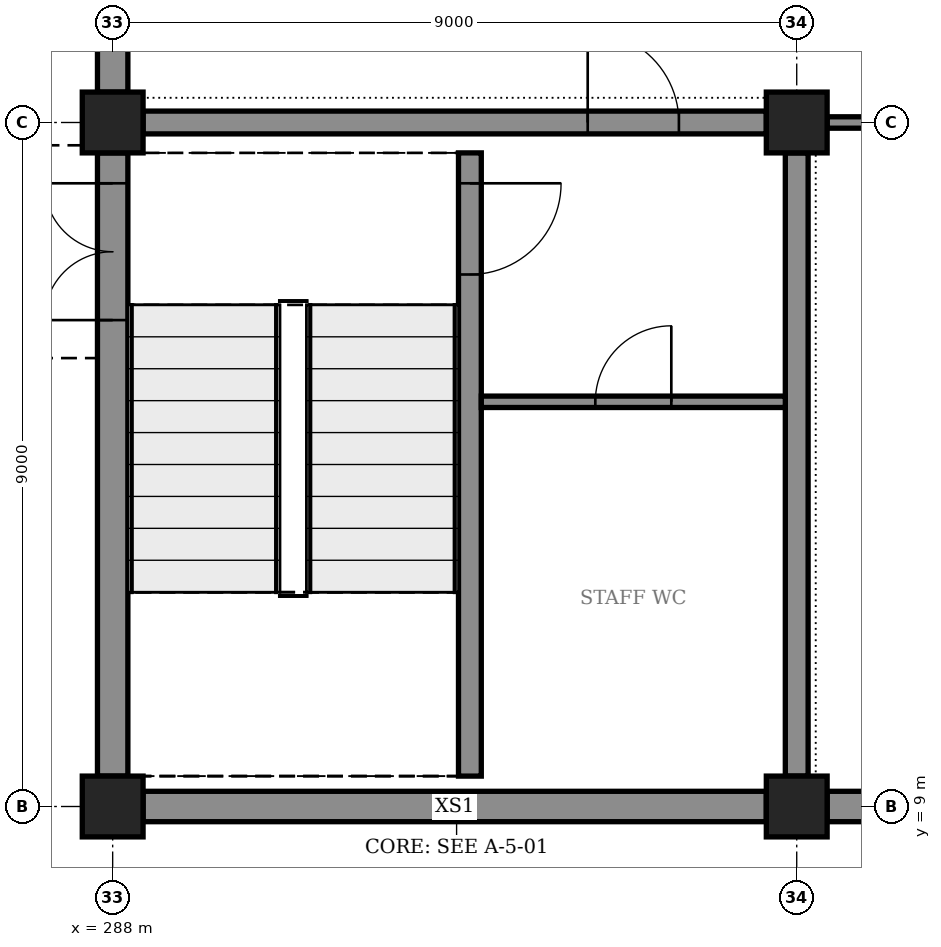
"""IFC4 building model, lengths in metres.
Left out: names, types, materials, properties, quantities, classifications, styles, units other than length and angle.
Written with IfcOpenShell. Run it as: python <this file> out.ifc"""

import sys

from ifc_helpers import new_model, si_unit, direction, frame, frame_2d, origin, origin_2d, place, context, subcontext, project, spatial, rectangle, extrude, element, fill, save


model = new_model("IFC4")
c1 = context("Model", 3, precision=1e-05, world=origin(), true_north=direction((0.0, 1.0)))
c2 = subcontext(c1, "Body", "Model", "MODEL_VIEW")
j1 = project(units=[si_unit("LENGTHUNIT", "METRE"), si_unit("PLANEANGLEUNIT", "RADIAN")], contexts=[c1])
p1 = place(None, origin())
s1 = spatial("IfcSite", under=j1, at=p1, CompositionType="ELEMENT")
p2 = place(p1, origin())
s2 = spatial("IfcBuilding", under=s1, at=p2, CompositionType="ELEMENT")
p3 = place(p2, origin())
s3 = spatial("IfcBuildingStorey", under=s2, at=p3, CompositionType="ELEMENT", Elevation=0.0)
for number, where, z_axis, x_axis in (
    (1, (288.0, 9.0, -0.3), (0.0, 0.0, 1.0), (1.0, 0.0, 0.0)),
    (2, (297.0, 9.0, -0.3), (0.0, 0.0, 1.0), (1.0, 0.0, 0.0)),
    (3, (288.0, 18.0, -0.3), (0.0, 0.0, 1.0), (1.0, 0.0, 0.0)),
    (4, (297.0, 18.0, -0.3), (0.0, 0.0, 1.0), (1.0, 0.0, 0.0)),
):
    element("IfcColumn", number, at=place(p3, frame(where, z_axis=z_axis, x_axis=x_axis)), inside=s3, PredefinedType="COLUMN", context=c2, shape_type="SweptSolid", body=[
        extrude(rectangle(XDim=0.8, YDim=0.8, at=origin_2d()), origin(), (0.0, 0.0, 1.0), 6.02),
    ])
p4 = place(p3, frame((288.0, 9.4, 0.0), z_axis=(0.0, 0.0, 1.0), x_axis=(0.0, 1.0, 0.0)))
e5 = element("IfcWall", 5, at=p4, inside=s3, PredefinedType="STANDARD", context=c2, shape_type="SweptSolid", body=[
    extrude(rectangle(XDim=8.2, YDim=0.4, at=frame_2d((4.1, 0.0))), origin(), (0.0, 0.0, 1.0), 5.02),
])
p5 = place(p4, frame((6.0, 0.0, 0.0)))
e6 = element("IfcOpeningElement", 6, at=p5, cuts=e5, PredefinedType="OPENING", context=c2, shape_type="SweptSolid", body=[
    extrude(rectangle(XDim=1.8, YDim=2.4, at=frame_2d((0.9, 1.2))), frame((0.0, 0.21, 0.0), z_axis=(0.0, -1.0, 0.0), x_axis=(1.0, 0.0, 0.0)), (0.0, 0.0, 1.0), 0.42),
])
p6 = place(p3, frame((288.0, 18.4, 0.0), z_axis=(0.0, 0.0, 1.0), x_axis=(0.0, 1.0, 0.0)))
e7 = element("IfcWall", 7, at=p6, inside=s3, PredefinedType="STANDARD", context=c2, shape_type="SweptSolid", body=[
    extrude(rectangle(XDim=8.2, YDim=0.4, at=frame_2d((4.1, 0.0))), origin(), (0.0, 0.0, 1.0), 5.02),
])
p7 = place(p6, frame((1.05, 0.0, 0.9)))
e8 = element("IfcOpeningElement", 8, at=p7, cuts=e7, PredefinedType="OPENING", context=c2, shape_type="SweptSolid", body=[
    extrude(rectangle(XDim=1.5, YDim=1.8, at=frame_2d((0.75, 0.9))), frame((0.0, 0.21, 0.0), z_axis=(0.0, -1.0, 0.0), x_axis=(1.0, 0.0, 0.0)), (0.0, 0.0, 1.0), 0.42),
])
p8 = place(p6, frame((3.55, 0.0, 0.9)))
e9 = element("IfcOpeningElement", 9, at=p8, cuts=e7, PredefinedType="OPENING", context=c2, shape_type="SweptSolid", body=[
    extrude(rectangle(XDim=1.5, YDim=1.8, at=frame_2d((0.75, 0.9))), frame((0.0, 0.21, 0.0), z_axis=(0.0, -1.0, 0.0), x_axis=(1.0, 0.0, 0.0)), (0.0, 0.0, 1.0), 0.42),
])
p9 = place(p6, frame((6.05, 0.0, 0.9)))
e10 = element("IfcOpeningElement", 10, at=p9, cuts=e7, PredefinedType="OPENING", context=c2, shape_type="SweptSolid", body=[
    extrude(rectangle(XDim=1.5, YDim=1.8, at=frame_2d((0.75, 0.9))), frame((0.0, 0.21, 0.0), z_axis=(0.0, -1.0, 0.0), x_axis=(1.0, 0.0, 0.0)), (0.0, 0.0, 1.0), 0.42),
])
p10 = place(p3, frame((288.4, 9.0, 0.0), z_axis=(0.0, 0.0, 1.0), x_axis=(1.0, 0.0, 0.0)))
e11 = element("IfcWall", 11, at=p10, inside=s3, PredefinedType="STANDARD", context=c2, shape_type="SweptSolid", body=[
    extrude(rectangle(XDim=8.2, YDim=0.4, at=frame_2d((4.1, 0.0))), origin(), (0.0, 0.0, 1.0), 5.02),
])
p11 = place(p3, frame((297.4, 9.0, 0.0), z_axis=(0.0, 0.0, 1.0), x_axis=(1.0, 0.0, 0.0)))
e12 = element("IfcWall", 12, at=p11, inside=s3, PredefinedType="STANDARD", context=c2, shape_type="SweptSolid", body=[
    extrude(rectangle(XDim=8.2, YDim=0.4, at=frame_2d((4.1, 0.0))), origin(), (0.0, 0.0, 1.0), 5.02),
])
p12 = place(p11, frame((3.5, 0.0, 0.0)))
e13 = element("IfcOpeningElement", 13, at=p12, cuts=e12, PredefinedType="OPENING", context=c2, shape_type="SweptSolid", body=[
    extrude(rectangle(XDim=1.2, YDim=2.4, at=frame_2d((0.6, 1.2))), frame((0.0, 0.21, 0.0), z_axis=(0.0, -1.0, 0.0), x_axis=(1.0, 0.0, 0.0)), (0.0, 0.0, 1.0), 0.42),
])
p13 = place(p3, frame((292.7, 9.4, 0.0), z_axis=(0.0, 0.0, 1.0), x_axis=(0.0, 1.0, 0.0)))
e14 = element("IfcWall", 14, at=p13, inside=s3, PredefinedType="STANDARD", context=c2, shape_type="SweptSolid", body=[
    extrude(rectangle(XDim=8.2, YDim=0.3, at=frame_2d((4.1, 0.0))), origin(), (0.0, 0.0, 1.0), 5.72),
])
p14 = place(p13, frame((6.6, 0.0, 0.0)))
e15 = element("IfcOpeningElement", 15, at=p14, cuts=e14, PredefinedType="OPENING", context=c2, shape_type="SweptSolid", body=[
    extrude(rectangle(XDim=1.2, YDim=2.4, at=frame_2d((0.6, 1.2))), frame((0.0, 0.16, 0.0), z_axis=(0.0, -1.0, 0.0), x_axis=(1.0, 0.0, 0.0)), (0.0, 0.0, 1.0), 0.32),
])
p15 = place(p3, frame((297.0, 9.4, 0.0), z_axis=(0.0, 0.0, 1.0), x_axis=(0.0, 1.0, 0.0)))
e16 = element("IfcWall", 16, at=p15, inside=s3, PredefinedType="STANDARD", context=c2, shape_type="SweptSolid", body=[
    extrude(rectangle(XDim=8.2, YDim=0.3, at=frame_2d((4.1, 0.0))), origin(), (0.0, 0.0, 1.0), 5.02),
])
p16 = place(p3, frame((288.4, 18.0, 0.0), z_axis=(0.0, 0.0, 1.0), x_axis=(1.0, 0.0, 0.0)))
e17 = element("IfcWall", 17, at=p16, inside=s3, PredefinedType="STANDARD", context=c2, shape_type="SweptSolid", body=[
    extrude(rectangle(XDim=8.2, YDim=0.3, at=frame_2d((4.1, 0.0))), origin(), (0.0, 0.0, 1.0), 5.02),
])
p17 = place(p16, frame((5.85, 0.0, 0.0)))
e18 = element("IfcOpeningElement", 18, at=p17, cuts=e17, PredefinedType="OPENING", context=c2, shape_type="SweptSolid", body=[
    extrude(rectangle(XDim=1.2, YDim=2.4, at=frame_2d((0.6, 1.2))), frame((0.0, 0.16, 0.0), z_axis=(0.0, -1.0, 0.0), x_axis=(1.0, 0.0, 0.0)), (0.0, 0.0, 1.0), 0.32),
])
p18 = place(p3, frame((292.85, 14.325, 0.0), z_axis=(0.0, 0.0, 1.0), x_axis=(1.0, 0.0, 0.0)))
e19 = element("IfcWall", 19, at=p18, inside=s3, PredefinedType="PARTITIONING", context=c2, shape_type="SweptSolid", body=[
    extrude(rectangle(XDim=4.0, YDim=0.15, at=frame_2d((2.0, 0.0))), origin(), (0.0, 0.0, 1.0), 5.72),
])
p19 = place(p18, frame((1.5, 0.0, 0.0)))
e20 = element("IfcOpeningElement", 20, at=p19, cuts=e19, PredefinedType="OPENING", context=c2, shape_type="SweptSolid", body=[
    extrude(rectangle(XDim=1.0, YDim=2.4, at=frame_2d((0.5, 1.2))), frame((0.0, 0.085, 0.0), z_axis=(0.0, -1.0, 0.0), x_axis=(1.0, 0.0, 0.0)), (0.0, 0.0, 1.0), 0.17),
])
p20 = place(p3, frame((297.4, 18.0, 0.0), z_axis=(0.0, 0.0, 1.0), x_axis=(1.0, 0.0, 0.0)))
e21 = element("IfcWall", 21, at=p20, inside=s3, PredefinedType="PARTITIONING", context=c2, shape_type="SweptSolid", body=[
    extrude(rectangle(XDim=8.2, YDim=0.15, at=frame_2d((4.1, 0.0))), origin(), (0.0, 0.0, 1.0), 5.02),
])
p21 = place(p20, frame((3.6, 0.0, 0.0)))
e22 = element("IfcOpeningElement", 22, at=p21, cuts=e21, PredefinedType="OPENING", context=c2, shape_type="SweptSolid", body=[
    extrude(rectangle(XDim=1.0, YDim=2.4, at=frame_2d((0.5, 1.2))), frame((0.0, 0.085, 0.0), z_axis=(0.0, -1.0, 0.0), x_axis=(1.0, 0.0, 0.0)), (0.0, 0.0, 1.0), 0.17),
])
p22 = place(p5, origin())
e23 = element("IfcDoor", 23, at=p22, inside=s3, OperationType="DOUBLE_DOOR_SINGLE_SWING", PredefinedType="DOOR", context=c2, shape_type="SweptSolid", body=[
    extrude(rectangle(XDim=1.8, YDim=2.4, at=frame_2d((0.9, 1.2))), frame((0.0, 0.025, 0.0), z_axis=(0.0, -1.0, 0.0), x_axis=(1.0, 0.0, 0.0)), (0.0, 0.0, 1.0), 0.05),
])
fill(e6, e23)
p23 = place(p14, frame((1.2, 0.0, 0.0), z_axis=(0.0, 0.0, 1.0), x_axis=(-1.0, 0.0, 0.0)))
e24 = element("IfcDoor", 24, at=p23, inside=s3, OperationType="SINGLE_SWING_RIGHT", PredefinedType="DOOR", context=c2, shape_type="SweptSolid", body=[
    extrude(rectangle(XDim=1.2, YDim=2.4, at=frame_2d((0.6, 1.2))), frame((0.0, 0.025, 0.0), z_axis=(0.0, -1.0, 0.0), x_axis=(1.0, 0.0, 0.0)), (0.0, 0.0, 1.0), 0.05),
])
fill(e15, e24)
p24 = place(p17, origin())
e25 = element("IfcDoor", 25, at=p24, inside=s3, OperationType="SINGLE_SWING_LEFT", PredefinedType="DOOR", context=c2, shape_type="SweptSolid", body=[
    extrude(rectangle(XDim=1.2, YDim=2.4, at=frame_2d((0.6, 1.2))), frame((0.0, 0.025, 0.0), z_axis=(0.0, -1.0, 0.0), x_axis=(1.0, 0.0, 0.0)), (0.0, 0.0, 1.0), 0.05),
])
fill(e18, e25)
p25 = place(p19, origin())
e26 = element("IfcDoor", 26, at=p25, inside=s3, OperationType="SINGLE_SWING_RIGHT", PredefinedType="DOOR", context=c2, shape_type="SweptSolid", body=[
    extrude(rectangle(XDim=1.0, YDim=2.4, at=frame_2d((0.5, 1.2))), frame((0.0, 0.025, 0.0), z_axis=(0.0, -1.0, 0.0), x_axis=(1.0, 0.0, 0.0)), (0.0, 0.0, 1.0), 0.05),
])
fill(e20, e26)
save(model, sys.argv[1])
